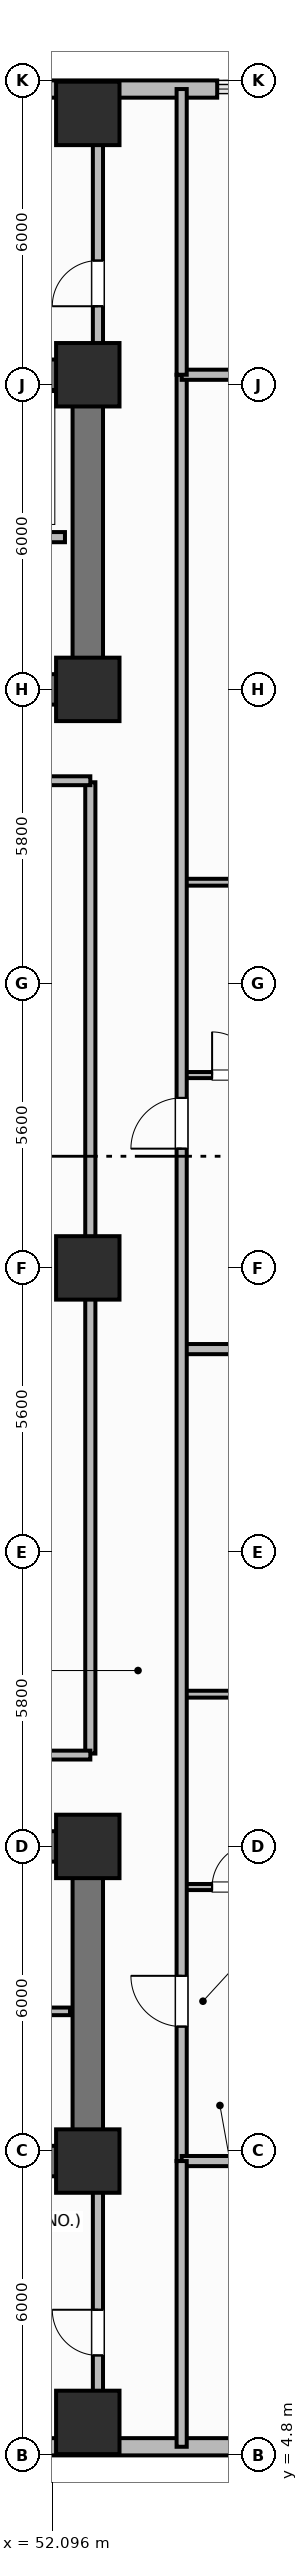
"""IFC4 building model, lengths in metres.
Left out: names, types, materials, properties, quantities, classifications, styles, units other than length and angle.
Written with IfcOpenShell. Run it as: python <this file> out.ifc"""

import sys

from ifc_helpers import new_model, si_unit, direction, frame, frame_2d, origin, origin_2d, place, context, subcontext, project, spatial, rectangle, extrude, element, fill, save


model = new_model("IFC4")
c1 = context("Model", 3, precision=1e-05, world=origin(), true_north=direction((0.0, 1.0)))
c2 = subcontext(c1, "Body", "Model", "MODEL_VIEW")
j1 = project(units=[si_unit("LENGTHUNIT", "METRE"), si_unit("PLANEANGLEUNIT", "RADIAN")], contexts=[c1])
p1 = place(None, origin())
s1 = spatial("IfcSite", under=j1, at=p1, CompositionType="ELEMENT")
p2 = place(p1, origin())
s2 = spatial("IfcBuilding", under=s1, at=p2, CompositionType="ELEMENT")
p3 = place(p2, frame((0.0, 0.0, 39.9)))
s3 = spatial("IfcBuildingStorey", under=s2, at=p3, CompositionType="ELEMENT", Elevation=39.9)
p4 = place(p3, frame((52.8, 10.6, 0.0), z_axis=(0.0, 0.0, 1.0), x_axis=(-1.0, 0.0, 0.0)))
e1 = element("IfcWall", 1, at=p4, inside=s3, PredefinedType="SHEAR", context=c2, shape_type="SweptSolid", body=[
    extrude(rectangle(XDim=27.2, YDim=0.6, at=frame_2d((13.6, 0.0))), origin(), (0.0, 0.0, 1.0), 3.7),
])
p5 = place(p3, frame((52.8, 10.9, 0.0), z_axis=(0.0, 0.0, 1.0), x_axis=(0.0, 1.0, 0.0)))
e2 = element("IfcWall", 2, at=p5, inside=s3, PredefinedType="SHEAR", context=c2, shape_type="SweptSolid", body=[
    extrude(rectangle(XDim=5.6, YDim=0.6, at=frame_2d((2.8, 0.0))), origin(), (0.0, 0.0, 1.0), 3.7),
])
p6 = place(p3, frame((25.6, 16.8, 0.0), z_axis=(0.0, 0.0, 1.0), x_axis=(1.0, 0.0, 0.0)))
e3 = element("IfcWall", 3, at=p6, inside=s3, PredefinedType="SHEAR", context=c2, shape_type="SweptSolid", body=[
    extrude(rectangle(XDim=27.2, YDim=0.6, at=frame_2d((13.6, 0.0))), origin(), (0.0, 0.0, 1.0), 3.7),
])
p7 = place(p6, frame((1.7, 0.0, 0.0)))
e4 = element("IfcOpeningElement", 4, at=p7, cuts=e3, PredefinedType="OPENING", context=c2, shape_type="SweptSolid", body=[
    extrude(rectangle(XDim=1.1, YDim=2.15, at=frame_2d((0.55, 1.075))), frame((0.0, 0.31, 0.0), z_axis=(0.0, -1.0, 0.0), x_axis=(1.0, 0.0, 0.0)), (0.0, 0.0, 1.0), 0.62),
])
p8 = place(p6, frame((4.45, 0.0, 0.0)))
e5 = element("IfcOpeningElement", 5, at=p8, cuts=e3, PredefinedType="OPENING", context=c2, shape_type="SweptSolid", body=[
    extrude(rectangle(XDim=0.85, YDim=2.1, at=frame_2d((0.425, 1.05))), frame((0.0, 0.31, 0.0), z_axis=(0.0, -1.0, 0.0), x_axis=(1.0, 0.0, 0.0)), (0.0, 0.0, 1.0), 0.62),
])
p9 = place(p6, frame((6.5, 0.0, 0.0)))
e6 = element("IfcOpeningElement", 6, at=p9, cuts=e3, PredefinedType="OPENING", context=c2, shape_type="SweptSolid", body=[
    extrude(rectangle(XDim=0.85, YDim=2.1, at=frame_2d((0.425, 1.05))), frame((0.0, 0.31, 0.0), z_axis=(0.0, -1.0, 0.0), x_axis=(1.0, 0.0, 0.0)), (0.0, 0.0, 1.0), 0.62),
])
p10 = place(p6, frame((13.0, 0.0, 0.0)))
e7 = element("IfcOpeningElement", 7, at=p10, cuts=e3, PredefinedType="OPENING", context=c2, shape_type="SweptSolid", body=[
    extrude(rectangle(XDim=1.2, YDim=2.15, at=frame_2d((0.6, 1.075))), frame((0.0, 0.31, 0.0), z_axis=(0.0, -1.0, 0.0), x_axis=(1.0, 0.0, 0.0)), (0.0, 0.0, 1.0), 0.62),
])
p11 = place(p6, frame((20.4, 0.0, 0.0)))
e8 = element("IfcOpeningElement", 8, at=p11, cuts=e3, PredefinedType="OPENING", context=c2, shape_type="SweptSolid", body=[
    extrude(rectangle(XDim=1.3, YDim=2.2, at=frame_2d((0.65, 1.1))), frame((0.0, 0.31, 0.0), z_axis=(0.0, -1.0, 0.0), x_axis=(1.0, 0.0, 0.0)), (0.0, 0.0, 1.0), 0.62),
])
p12 = place(p6, frame((24.65, 0.0, 0.0)))
e9 = element("IfcOpeningElement", 9, at=p12, cuts=e3, PredefinedType="OPENING", context=c2, shape_type="SweptSolid", body=[
    extrude(rectangle(XDim=0.85, YDim=2.1, at=frame_2d((0.425, 1.05))), frame((0.0, 0.31, 0.0), z_axis=(0.0, -1.0, 0.0), x_axis=(1.0, 0.0, 0.0)), (0.0, 0.0, 1.0), 0.62),
])
p13 = place(p3, frame((25.6, 45.8, 0.0), z_axis=(0.0, 0.0, 1.0), x_axis=(1.0, 0.0, 0.0)))
e10 = element("IfcWall", 10, at=p13, inside=s3, PredefinedType="SHEAR", context=c2, shape_type="SweptSolid", body=[
    extrude(rectangle(XDim=27.2, YDim=0.6, at=frame_2d((13.6, 0.0))), origin(), (0.0, 0.0, 1.0), 3.7),
])
p14 = place(p3, frame((52.8, 39.9, 0.0), z_axis=(0.0, 0.0, 1.0), x_axis=(0.0, 1.0, 0.0)))
e11 = element("IfcWall", 11, at=p14, inside=s3, PredefinedType="SHEAR", context=c2, shape_type="SweptSolid", body=[
    extrude(rectangle(XDim=5.6, YDim=0.6, at=frame_2d((2.8, 0.0))), origin(), (0.0, 0.0, 1.0), 3.7),
])
p15 = place(p3, frame((52.8, 39.6, 0.0), z_axis=(0.0, 0.0, 1.0), x_axis=(-1.0, 0.0, 0.0)))
e12 = element("IfcWall", 12, at=p15, inside=s3, PredefinedType="SHEAR", context=c2, shape_type="SweptSolid", body=[
    extrude(rectangle(XDim=27.2, YDim=0.6, at=frame_2d((13.6, 0.0))), origin(), (0.0, 0.0, 1.0), 3.7),
])
p16 = place(p15, frame((24.3, 0.0, 0.0)))
e13 = element("IfcOpeningElement", 13, at=p16, cuts=e12, PredefinedType="OPENING", context=c2, shape_type="SweptSolid", body=[
    extrude(rectangle(XDim=1.1, YDim=2.15, at=frame_2d((0.55, 1.075))), frame((0.0, 0.31, 0.0), z_axis=(0.0, -1.0, 0.0), x_axis=(1.0, 0.0, 0.0)), (0.0, 0.0, 1.0), 0.62),
])
p17 = place(p15, frame((21.85, 0.0, 0.0)))
e14 = element("IfcOpeningElement", 14, at=p17, cuts=e12, PredefinedType="OPENING", context=c2, shape_type="SweptSolid", body=[
    extrude(rectangle(XDim=0.85, YDim=2.1, at=frame_2d((0.425, 1.05))), frame((0.0, 0.31, 0.0), z_axis=(0.0, -1.0, 0.0), x_axis=(1.0, 0.0, 0.0)), (0.0, 0.0, 1.0), 0.62),
])
p18 = place(p15, frame((19.85, 0.0, 0.0)))
e15 = element("IfcOpeningElement", 15, at=p18, cuts=e12, PredefinedType="OPENING", context=c2, shape_type="SweptSolid", body=[
    extrude(rectangle(XDim=0.85, YDim=2.1, at=frame_2d((0.425, 1.05))), frame((0.0, 0.31, 0.0), z_axis=(0.0, -1.0, 0.0), x_axis=(1.0, 0.0, 0.0)), (0.0, 0.0, 1.0), 0.62),
])
p19 = place(p15, frame((15.1, 0.0, 0.0)))
e16 = element("IfcOpeningElement", 16, at=p19, cuts=e12, PredefinedType="OPENING", context=c2, shape_type="SweptSolid", body=[
    extrude(rectangle(XDim=1.2, YDim=2.15, at=frame_2d((0.6, 1.075))), frame((0.0, 0.31, 0.0), z_axis=(0.0, -1.0, 0.0), x_axis=(1.0, 0.0, 0.0)), (0.0, 0.0, 1.0), 0.62),
])
p20 = place(p15, frame((12.6, 0.0, 0.0)))
e17 = element("IfcOpeningElement", 17, at=p20, cuts=e12, PredefinedType="OPENING", context=c2, shape_type="SweptSolid", body=[
    extrude(rectangle(XDim=0.85, YDim=2.1, at=frame_2d((0.425, 1.05))), frame((0.0, 0.31, 0.0), z_axis=(0.0, -1.0, 0.0), x_axis=(1.0, 0.0, 0.0)), (0.0, 0.0, 1.0), 0.62),
])
p21 = place(p15, frame((10.85, 0.0, 0.0)))
e18 = element("IfcOpeningElement", 18, at=p21, cuts=e12, PredefinedType="OPENING", context=c2, shape_type="SweptSolid", body=[
    extrude(rectangle(XDim=0.85, YDim=2.1, at=frame_2d((0.425, 1.05))), frame((0.0, 0.31, 0.0), z_axis=(0.0, -1.0, 0.0), x_axis=(1.0, 0.0, 0.0)), (0.0, 0.0, 1.0), 0.62),
])
p22 = place(p15, frame((6.85, 0.0, 0.0)))
e19 = element("IfcOpeningElement", 19, at=p22, cuts=e12, PredefinedType="OPENING", context=c2, shape_type="SweptSolid", body=[
    extrude(rectangle(XDim=0.85, YDim=2.1, at=frame_2d((0.425, 1.05))), frame((0.0, 0.31, 0.0), z_axis=(0.0, -1.0, 0.0), x_axis=(1.0, 0.0, 0.0)), (0.0, 0.0, 1.0), 0.62),
])
p23 = place(p15, frame((2.0, 0.0, 0.0)))
e20 = element("IfcOpeningElement", 20, at=p23, cuts=e12, PredefinedType="OPENING", context=c2, shape_type="SweptSolid", body=[
    extrude(rectangle(XDim=0.85, YDim=2.1, at=frame_2d((0.425, 1.05))), frame((0.0, 0.31, 0.0), z_axis=(0.0, -1.0, 0.0), x_axis=(1.0, 0.0, 0.0)), (0.0, 0.0, 1.0), 0.62),
])
for number, where, z_axis, x_axis in (
    (21, (52.8, 10.6, 0.0), (0.0, 0.0, 1.0), (1.0, 0.0, 0.0)),
    (22, (52.8, 16.8, 0.0), (0.0, 0.0, 1.0), (1.0, 0.0, 0.0)),
    (23, (52.8, 39.6, 0.0), (0.0, 0.0, 1.0), (1.0, 0.0, 0.0)),
    (24, (52.8, 45.8, 0.0), (0.0, 0.0, 1.0), (1.0, 0.0, 0.0)),
    (25, (52.8, 28.2, 0.0), (0.0, 0.0, 1.0), (1.0, 0.0, 0.0)),
    (26, (52.8, 5.45, 0.0), (0.0, 0.0, 1.0), (1.0, 0.0, 0.0)),
    (27, (52.8, 50.95, 0.0), (0.0, 0.0, 1.0), (1.0, 0.0, 0.0)),
):
    element("IfcColumn", number, at=place(p3, frame(where, z_axis=z_axis, x_axis=x_axis)), inside=s3, PredefinedType="COLUMN", context=c2, shape_type="SweptSolid", body=[
        extrude(rectangle(XDim=1.25, YDim=1.25, at=origin_2d()), origin(), (0.0, 0.0, 1.0), 3.7),
    ])
p24 = place(p3, frame((51.25, 4.97, 0.0), z_axis=(0.0, 0.0, 1.0), x_axis=(1.0, 0.0, 0.0)))
e28 = element("IfcWall", 28, at=p24, inside=s3, PredefinedType="SOLIDWALL", context=c2, shape_type="SweptSolid", body=[
    extrude(rectangle(XDim=8.55, YDim=0.34, at=frame_2d((4.275, 0.0))), origin(), (0.0, 0.0, 1.0), 2.7),
])
p25 = place(p24, frame((5.038, 0.0, 0.68)))
e29 = element("IfcOpeningElement", 29, at=p25, cuts=e28, PredefinedType="OPENING", context=c2, shape_type="SweptSolid", body=[
    extrude(rectangle(XDim=2.1, YDim=1.9, at=frame_2d((1.05, 0.95))), frame((0.0, 0.18, 0.0), z_axis=(0.0, -1.0, 0.0), x_axis=(1.0, 0.0, 0.0)), (0.0, 0.0, 1.0), 0.36),
])
p26 = place(p3, frame((55.35, 51.43, 0.0), z_axis=(0.0, 0.0, 1.0), x_axis=(-1.0, 0.0, 0.0)))
e30 = element("IfcWall", 30, at=p26, inside=s3, PredefinedType="SOLIDWALL", context=c2, shape_type="SweptSolid", body=[
    extrude(rectangle(XDim=12.95, YDim=0.34, at=frame_2d((6.475, 0.0))), origin(), (0.0, 0.0, 1.0), 2.7),
])
p27 = place(p26, frame((4.319, 0.0, 0.73)))
e31 = element("IfcOpeningElement", 31, at=p27, cuts=e30, PredefinedType="OPENING", context=c2, shape_type="SweptSolid", body=[
    extrude(rectangle(XDim=1.4, YDim=1.85, at=frame_2d((0.7, 0.925))), frame((0.0, 0.18, 0.0), z_axis=(0.0, -1.0, 0.0), x_axis=(1.0, 0.0, 0.0)), (0.0, 0.0, 1.0), 0.36),
])
p28 = place(p26, frame((8.281, 0.0, 0.73)))
e32 = element("IfcOpeningElement", 32, at=p28, cuts=e30, PredefinedType="OPENING", context=c2, shape_type="SweptSolid", body=[
    extrude(rectangle(XDim=1.4, YDim=1.85, at=frame_2d((0.7, 0.925))), frame((0.0, 0.18, 0.0), z_axis=(0.0, -1.0, 0.0), x_axis=(1.0, 0.0, 0.0)), (0.0, 0.0, 1.0), 0.36),
])
p29 = place(p3, frame((49.6, 13.55, 0.0), z_axis=(0.0, 0.0, 1.0), x_axis=(1.0, 0.0, 0.0)))
e33 = element("IfcWall", 33, at=p29, inside=s3, PredefinedType="PARTITIONING", context=c2, shape_type="SweptSolid", body=[
    extrude(rectangle(XDim=2.85, YDim=0.15, at=frame_2d((1.425, 0.0))), origin(), (0.0, 0.0, 1.0), 2.53),
])
p30 = place(p29, frame((0.9, 0.0, 0.0)))
e34 = element("IfcOpeningElement", 34, at=p30, cuts=e33, PredefinedType="OPENING", context=c2, shape_type="SweptSolid", body=[
    extrude(rectangle(XDim=0.85, YDim=2.1, at=frame_2d((0.425, 1.05))), frame((0.0, 0.085, 0.0), z_axis=(0.0, -1.0, 0.0), x_axis=(1.0, 0.0, 0.0)), (0.0, 0.0, 1.0), 0.17),
])
p31 = place(p3, frame((52.35, 42.6, 0.0), z_axis=(0.0, 0.0, 1.0), x_axis=(-1.0, 0.0, 0.0)))
e35 = element("IfcWall", 35, at=p31, inside=s3, PredefinedType="PARTITIONING", context=c2, shape_type="SweptSolid", body=[
    extrude(rectangle(XDim=8.8, YDim=0.2, at=frame_2d((4.4, 0.0))), origin(), (0.0, 0.0, 1.0), 2.53),
])
p32 = place(p3, frame((52.85, 18.63, 0.0), z_axis=(0.0, 0.0, 1.0), x_axis=(0.0, 1.0, 0.0)))
e36 = element("IfcWall", 36, at=p32, inside=s3, PredefinedType="PARTITIONING", context=c2, shape_type="SweptSolid", body=[
    extrude(rectangle(XDim=19.14, YDim=0.2, at=frame_2d((9.57, 0.0))), origin(), (0.0, 0.0, 1.0), 2.53),
])
for number, where, z_axis, x_axis in (
    (37, (42.75, 18.6, 0.0), (0.0, 0.0, 1.0), (1.0, 0.0, 0.0)),
    (38, (42.75, 37.8, 0.0), (0.0, 0.0, 1.0), (1.0, 0.0, 0.0)),
):
    element("IfcWall", number, at=place(p3, frame(where, z_axis=z_axis, x_axis=x_axis)), inside=s3, PredefinedType="PARTITIONING", context=c2, shape_type="SweptSolid", body=[
        extrude(rectangle(XDim=10.1, YDim=0.175, at=frame_2d((5.05, 0.0))), origin(), (0.0, 0.0, 1.0), 2.53),
    ])
p33 = place(p3, frame((54.65, 16.0, 0.0), z_axis=(0.0, 0.0, 1.0), x_axis=(1.0, 0.0, 0.0)))
e39 = element("IfcWall", 39, at=p33, inside=s3, PredefinedType="PARTITIONING", context=c2, shape_type="SweptSolid", body=[
    extrude(rectangle(XDim=2.25, YDim=0.12, at=frame_2d((1.125, 0.0))), origin(), (0.0, 0.0, 1.0), 2.53),
])
p34 = place(p33, frame((0.6, 0.0, 0.0)))
e40 = element("IfcOpeningElement", 40, at=p34, cuts=e39, PredefinedType="OPENING", context=c2, shape_type="SweptSolid", body=[
    extrude(rectangle(XDim=0.85, YDim=2.1, at=frame_2d((0.425, 1.05))), frame((0.0, 0.07, 0.0), z_axis=(0.0, -1.0, 0.0), x_axis=(1.0, 0.0, 0.0)), (0.0, 0.0, 1.0), 0.14),
])
p35 = place(p3, frame((54.65, 19.8, 0.0), z_axis=(0.0, 0.0, 1.0), x_axis=(1.0, 0.0, 0.0)))
e41 = element("IfcWall", 41, at=p35, inside=s3, PredefinedType="PARTITIONING", context=c2, shape_type="SweptSolid", body=[
    extrude(rectangle(XDim=2.25, YDim=0.135, at=frame_2d((1.125, 0.0))), origin(), (0.0, 0.0, 1.0), 2.53),
])
p36 = place(p3, frame((54.65, 26.6, 0.0), z_axis=(0.0, 0.0, 1.0), x_axis=(1.0, 0.0, 0.0)))
e42 = element("IfcWall", 42, at=p36, inside=s3, PredefinedType="PARTITIONING", context=c2, shape_type="SweptSolid", body=[
    extrude(rectangle(XDim=8.666, YDim=0.2, at=frame_2d((4.333, 0.0))), origin(), (0.0, 0.0, 1.0), 2.53),
])
p37 = place(p3, frame((54.65, 32.0, 0.0), z_axis=(0.0, 0.0, 1.0), x_axis=(1.0, 0.0, 0.0)))
e43 = element("IfcWall", 43, at=p37, inside=s3, PredefinedType="PARTITIONING", context=c2, shape_type="SweptSolid", body=[
    extrude(rectangle(XDim=2.25, YDim=0.12, at=frame_2d((1.125, 0.0))), origin(), (0.0, 0.0, 1.0), 2.53),
])
p38 = place(p37, frame((0.6, 0.0, 0.0)))
e44 = element("IfcOpeningElement", 44, at=p38, cuts=e43, PredefinedType="OPENING", context=c2, shape_type="SweptSolid", body=[
    extrude(rectangle(XDim=0.85, YDim=2.1, at=frame_2d((0.425, 1.05))), frame((0.0, 0.07, 0.0), z_axis=(0.0, -1.0, 0.0), x_axis=(1.0, 0.0, 0.0)), (0.0, 0.0, 1.0), 0.14),
])
p39 = place(p3, frame((54.65, 35.8, 0.0), z_axis=(0.0, 0.0, 1.0), x_axis=(1.0, 0.0, 0.0)))
e45 = element("IfcWall", 45, at=p39, inside=s3, PredefinedType="PARTITIONING", context=c2, shape_type="SweptSolid", body=[
    extrude(rectangle(XDim=2.25, YDim=0.135, at=frame_2d((1.125, 0.0))), origin(), (0.0, 0.0, 1.0), 2.53),
])
p40 = place(p3, frame((54.65, 10.6, 0.0), z_axis=(0.0, 0.0, 1.0), x_axis=(0.0, 1.0, 0.0)))
e46 = element("IfcWall", 46, at=p40, inside=s3, PredefinedType="PARTITIONING", context=c2, shape_type="SweptSolid", body=[
    extrude(rectangle(XDim=35.2, YDim=0.2, at=frame_2d((17.6, 0.0))), origin(), (0.0, 0.0, 1.0), 2.53),
])
p41 = place(p40, frame((2.65, 0.0, 0.0)))
e47 = element("IfcOpeningElement", 47, at=p41, cuts=e46, PredefinedType="OPENING", context=c2, shape_type="SweptSolid", body=[
    extrude(rectangle(XDim=1.0, YDim=2.15, at=frame_2d((0.5, 1.075))), frame((0.0, 0.11, 0.0), z_axis=(0.0, -1.0, 0.0), x_axis=(1.0, 0.0, 0.0)), (0.0, 0.0, 1.0), 0.22),
])
p42 = place(p40, frame((19.95, 0.0, 0.0)))
e48 = element("IfcOpeningElement", 48, at=p42, cuts=e46, PredefinedType="OPENING", context=c2, shape_type="SweptSolid", body=[
    extrude(rectangle(XDim=1.0, YDim=2.15, at=frame_2d((0.5, 1.075))), frame((0.0, 0.11, 0.0), z_axis=(0.0, -1.0, 0.0), x_axis=(1.0, 0.0, 0.0)), (0.0, 0.0, 1.0), 0.22),
])
for number, where, z_axis, x_axis in (
    (49, (54.65, 10.6, 0.0), (0.0, 0.0, 1.0), (1.0, 0.0, 0.0)),
    (50, (54.65, 45.8, 0.0), (0.0, 0.0, 1.0), (1.0, 0.0, 0.0)),
):
    element("IfcWall", number, at=place(p3, frame(where, z_axis=z_axis, x_axis=x_axis)), inside=s3, PredefinedType="PARTITIONING", context=c2, shape_type="SweptSolid", body=[
        extrude(rectangle(XDim=8.76, YDim=0.2, at=frame_2d((4.38, 0.0))), origin(), (0.0, 0.0, 1.0), 2.53),
    ])
p43 = place(p3, frame((54.65, 4.97, 0.0), z_axis=(0.0, 0.0, 1.0), x_axis=(0.0, 1.0, 0.0)))
e51 = element("IfcWall", 51, at=p43, inside=s3, PredefinedType="PARTITIONING", context=c2, shape_type="SweptSolid", body=[
    extrude(rectangle(XDim=5.63, YDim=0.2, at=frame_2d((2.815, 0.0))), origin(), (0.0, 0.0, 1.0), 2.53),
])
p44 = place(p3, frame((54.65, 45.8, 0.0), z_axis=(0.0, 0.0, 1.0), x_axis=(0.0, 1.0, 0.0)))
e52 = element("IfcWall", 52, at=p44, inside=s3, PredefinedType="PARTITIONING", context=c2, shape_type="SweptSolid", body=[
    extrude(rectangle(XDim=5.63, YDim=0.2, at=frame_2d((2.815, 0.0))), origin(), (0.0, 0.0, 1.0), 2.53),
])
p45 = place(p3, frame((53.0, 5.92, 0.0), z_axis=(0.0, 0.0, 1.0), x_axis=(0.0, 1.0, 0.0)))
e53 = element("IfcWall", 53, at=p45, inside=s3, PredefinedType="PARTITIONING", context=c2, shape_type="SweptSolid", body=[
    extrude(rectangle(XDim=4.38, YDim=0.2, at=frame_2d((2.19, 0.0))), origin(), (0.0, 0.0, 1.0), 2.53),
])
p46 = place(p45, frame((0.85, 0.0, 0.0)))
e54 = element("IfcOpeningElement", 54, at=p46, cuts=e53, PredefinedType="OPENING", context=c2, shape_type="SweptSolid", body=[
    extrude(rectangle(XDim=0.9, YDim=2.1, at=frame_2d((0.45, 1.05))), frame((0.0, 0.11, 0.0), z_axis=(0.0, -1.0, 0.0), x_axis=(1.0, 0.0, 0.0)), (0.0, 0.0, 1.0), 0.22),
])
p47 = place(p3, frame((53.0, 46.1, 0.0), z_axis=(0.0, 0.0, 1.0), x_axis=(0.0, 1.0, 0.0)))
e55 = element("IfcWall", 55, at=p47, inside=s3, PredefinedType="PARTITIONING", context=c2, shape_type="SweptSolid", body=[
    extrude(rectangle(XDim=4.38, YDim=0.2, at=frame_2d((2.19, 0.0))), origin(), (0.0, 0.0, 1.0), 2.53),
])
p48 = place(p47, frame((1.05, 0.0, 0.0)))
e56 = element("IfcOpeningElement", 56, at=p48, cuts=e55, PredefinedType="OPENING", context=c2, shape_type="SweptSolid", body=[
    extrude(rectangle(XDim=0.9, YDim=2.1, at=frame_2d((0.45, 1.05))), frame((0.0, 0.11, 0.0), z_axis=(0.0, -1.0, 0.0), x_axis=(1.0, 0.0, 0.0)), (0.0, 0.0, 1.0), 0.22),
])
p49 = place(p34, origin())
e57 = element("IfcDoor", 57, at=p49, inside=s3, OperationType="SINGLE_SWING_RIGHT", PredefinedType="DOOR", context=c2, shape_type="SweptSolid", body=[
    extrude(rectangle(XDim=0.85, YDim=2.1, at=frame_2d((0.425, 1.05))), frame((0.0, 0.025, 0.0), z_axis=(0.0, -1.0, 0.0), x_axis=(1.0, 0.0, 0.0)), (0.0, 0.0, 1.0), 0.05),
])
fill(e40, e57)
p50 = place(p38, origin())
e58 = element("IfcDoor", 58, at=p50, inside=s3, OperationType="SINGLE_SWING_LEFT", PredefinedType="DOOR", context=c2, shape_type="SweptSolid", body=[
    extrude(rectangle(XDim=0.85, YDim=2.1, at=frame_2d((0.425, 1.05))), frame((0.0, 0.025, 0.0), z_axis=(0.0, -1.0, 0.0), x_axis=(1.0, 0.0, 0.0)), (0.0, 0.0, 1.0), 0.05),
])
fill(e44, e58)
p51 = place(p41, origin())
e59 = element("IfcDoor", 59, at=p51, inside=s3, OperationType="SINGLE_SWING_RIGHT", PredefinedType="DOOR", context=c2, shape_type="SweptSolid", body=[
    extrude(rectangle(XDim=1.0, YDim=2.15, at=frame_2d((0.5, 1.075))), frame((0.0, 0.025, 0.0), z_axis=(0.0, -1.0, 0.0), x_axis=(1.0, 0.0, 0.0)), (0.0, 0.0, 1.0), 0.05),
])
fill(e47, e59)
p52 = place(p42, origin())
e60 = element("IfcDoor", 60, at=p52, inside=s3, OperationType="SINGLE_SWING_LEFT", PredefinedType="DOOR", context=c2, shape_type="SweptSolid", body=[
    extrude(rectangle(XDim=1.0, YDim=2.15, at=frame_2d((0.5, 1.075))), frame((0.0, 0.025, 0.0), z_axis=(0.0, -1.0, 0.0), x_axis=(1.0, 0.0, 0.0)), (0.0, 0.0, 1.0), 0.05),
])
fill(e48, e60)
p53 = place(p46, origin())
e61 = element("IfcDoor", 61, at=p53, inside=s3, OperationType="SINGLE_SWING_RIGHT", PredefinedType="DOOR", context=c2, shape_type="SweptSolid", body=[
    extrude(rectangle(XDim=0.9, YDim=2.1, at=frame_2d((0.45, 1.05))), frame((0.0, 0.025, 0.0), z_axis=(0.0, -1.0, 0.0), x_axis=(1.0, 0.0, 0.0)), (0.0, 0.0, 1.0), 0.05),
])
fill(e54, e61)
p54 = place(p48, origin())
e62 = element("IfcDoor", 62, at=p54, inside=s3, OperationType="SINGLE_SWING_LEFT", PredefinedType="DOOR", context=c2, shape_type="SweptSolid", body=[
    extrude(rectangle(XDim=0.9, YDim=2.1, at=frame_2d((0.45, 1.05))), frame((0.0, 0.025, 0.0), z_axis=(0.0, -1.0, 0.0), x_axis=(1.0, 0.0, 0.0)), (0.0, 0.0, 1.0), 0.05),
])
fill(e56, e62)
save(model, sys.argv[1])
